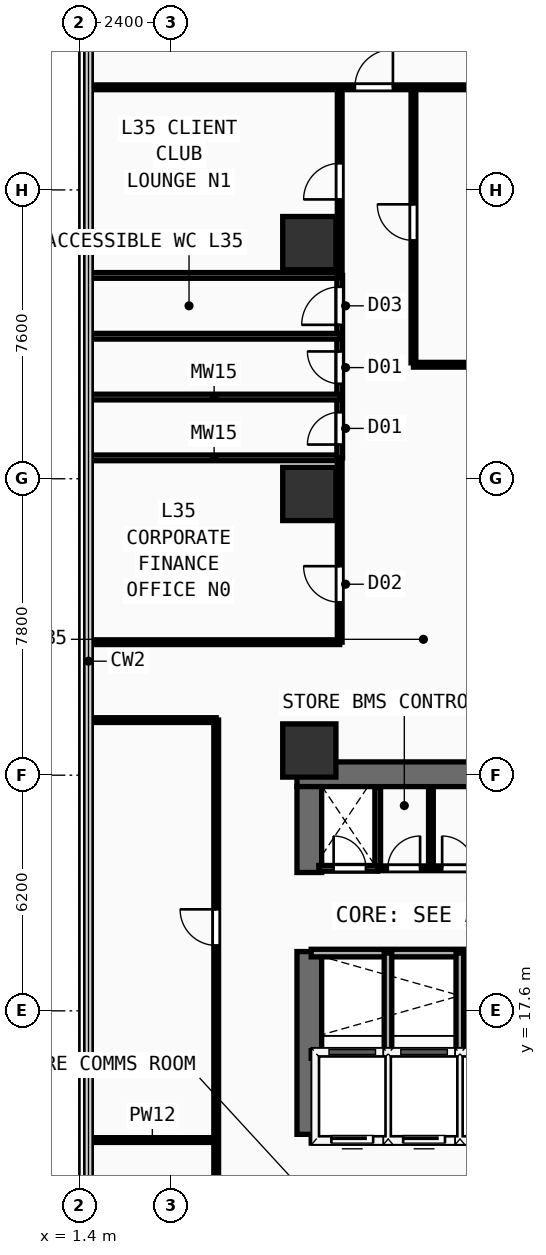
"""IFC4 building model, lengths in metres.
Left out: names, types, materials, properties, quantities, classifications, styles, units other than length and angle.
Written with IfcOpenShell. Run it as: python <this file> out.ifc"""

import sys

from ifc_helpers import new_model, si_unit, direction, frame, frame_2d, origin, origin_2d, place, context, subcontext, project, spatial, rectangle, extrude, element, fill, save


model = new_model("IFC4")
c1 = context("Model", 3, precision=1e-05, world=origin(), true_north=direction((0.0, 1.0)))
c2 = subcontext(c1, "Body", "Model", "MODEL_VIEW")
j1 = project(units=[si_unit("LENGTHUNIT", "METRE"), si_unit("PLANEANGLEUNIT", "RADIAN")], contexts=[c1])
p1 = place(None, origin())
s1 = spatial("IfcSite", under=j1, at=p1, CompositionType="ELEMENT")
p2 = place(p1, origin())
s2 = spatial("IfcBuilding", under=s1, at=p2, CompositionType="ELEMENT")
p3 = place(p2, frame((0.0, 0.0, 137.3)))
s3 = spatial("IfcBuildingStorey", under=s2, at=p3, CompositionType="ELEMENT", Elevation=137.3)
p4 = place(p3, frame((7.125, 23.825, 0.0), z_axis=(0.0, 0.0, 1.0), x_axis=(1.0, 0.0, 0.0)))
e1 = element("IfcWall", 1, at=p4, inside=s3, PredefinedType="SHEAR", context=c2, shape_type="SweptSolid", body=[
    extrude(rectangle(XDim=14.0, YDim=0.65, at=frame_2d((7.0, 0.0))), origin(), (0.0, 0.0, 1.0), 3.42),
])
p5 = place(p3, frame((7.45, 14.35, 0.0), z_axis=(0.0, 0.0, 1.0), x_axis=(0.0, 1.0, 0.0)))
e2 = element("IfcWall", 2, at=p5, inside=s3, PredefinedType="SHEAR", context=c2, shape_type="SweptSolid", body=[
    extrude(rectangle(XDim=4.81, YDim=0.65, at=frame_2d((2.405, 0.0))), origin(), (0.0, 0.0, 1.0), 3.42),
])
p6 = place(p3, frame((7.45, 21.24, 0.0), z_axis=(0.0, 0.0, 1.0), x_axis=(0.0, 1.0, 0.0)))
e3 = element("IfcWall", 3, at=p6, inside=s3, PredefinedType="SHEAR", context=c2, shape_type="SweptSolid", body=[
    extrude(rectangle(XDim=2.26, YDim=0.65, at=frame_2d((1.13, 0.0))), origin(), (0.0, 0.0, 1.0), 3.42),
])
for number, where, z_axis, x_axis in (
    (4, (7.45, 24.45, 0.0), (0.0, 0.0, 1.0), (1.0, 0.0, 0.0)),
    (5, (7.45, 31.2, 0.0), (0.0, 0.0, 1.0), (1.0, 0.0, 0.0)),
    (6, (7.45, 37.8, 0.0), (0.0, 0.0, 1.0), (1.0, 0.0, 0.0)),
):
    element("IfcColumn", number, at=place(p3, frame(where, z_axis=z_axis, x_axis=x_axis)), inside=s3, PredefinedType="COLUMN", context=c2, shape_type="SweptSolid", body=[
        extrude(rectangle(XDim=1.4, YDim=1.4, at=origin_2d()), origin(), (0.0, 0.0, 1.0), 3.42),
    ])
p7 = place(p3, frame((7.5, 14.22, 0.0), z_axis=(0.0, 0.0, 1.0), x_axis=(1.0, 0.0, 0.0)))
e7 = element("IfcWall", 7, at=p7, inside=s3, PredefinedType="PARTITIONING", context=c2, shape_type="SweptSolid", body=[
    extrude(rectangle(XDim=7.85, YDim=0.2, at=frame_2d((3.925, 0.0))), origin(), (0.0, 0.0, 1.0), 3.42),
])
p8 = place(p7, frame((0.53, 0.0, 0.0)))
e8 = element("IfcOpeningElement", 8, at=p8, cuts=e7, PredefinedType="OPENING", context=c2, shape_type="SweptSolid", body=[
    extrude(rectangle(XDim=1.1, YDim=2.2, at=frame_2d((0.55, 1.1))), frame((0.0, 0.11, 0.0), z_axis=(0.0, -1.0, 0.0), x_axis=(1.0, 0.0, 0.0)), (0.0, 0.0, 1.0), 0.22),
])
p9 = place(p7, frame((2.42, 0.0, 0.0)))
e9 = element("IfcOpeningElement", 9, at=p9, cuts=e7, PredefinedType="OPENING", context=c2, shape_type="SweptSolid", body=[
    extrude(rectangle(XDim=1.1, YDim=2.2, at=frame_2d((0.55, 1.1))), frame((0.0, 0.11, 0.0), z_axis=(0.0, -1.0, 0.0), x_axis=(1.0, 0.0, 0.0)), (0.0, 0.0, 1.0), 0.22),
])
p10 = place(p7, frame((4.31, 0.0, 0.0)))
e10 = element("IfcOpeningElement", 10, at=p10, cuts=e7, PredefinedType="OPENING", context=c2, shape_type="SweptSolid", body=[
    extrude(rectangle(XDim=1.1, YDim=2.2, at=frame_2d((0.55, 1.1))), frame((0.0, 0.11, 0.0), z_axis=(0.0, -1.0, 0.0), x_axis=(1.0, 0.0, 0.0)), (0.0, 0.0, 1.0), 0.22),
])
p11 = place(p7, frame((6.2, 0.0, 0.0)))
e11 = element("IfcOpeningElement", 11, at=p11, cuts=e7, PredefinedType="OPENING", context=c2, shape_type="SweptSolid", body=[
    extrude(rectangle(XDim=1.1, YDim=2.2, at=frame_2d((0.55, 1.1))), frame((0.0, 0.11, 0.0), z_axis=(0.0, -1.0, 0.0), x_axis=(1.0, 0.0, 0.0)), (0.0, 0.0, 1.0), 0.22),
])
p12 = place(p3, frame((7.5, 16.45, 0.0), z_axis=(0.0, 0.0, 1.0), x_axis=(1.0, 0.0, 0.0)))
e12 = element("IfcWall", 12, at=p12, inside=s3, PredefinedType="PARTITIONING", context=c2, shape_type="SweptSolid", body=[
    extrude(rectangle(XDim=7.85, YDim=0.2, at=frame_2d((3.925, 0.0))), origin(), (0.0, 0.0, 1.0), 3.42),
])
for number, where, z_axis, x_axis in (
    (13, (9.52, 14.22, 0.0), (0.0, 0.0, 1.0), (0.0, 1.0, 0.0)),
    (14, (11.41, 14.22, 0.0), (0.0, 0.0, 1.0), (0.0, 1.0, 0.0)),
):
    element("IfcWall", number, at=place(p3, frame(where, z_axis=z_axis, x_axis=x_axis)), inside=s3, PredefinedType="PARTITIONING", context=c2, shape_type="SweptSolid", body=[
        extrude(rectangle(XDim=2.23, YDim=0.2, at=frame_2d((1.115, 0.0))), origin(), (0.0, 0.0, 1.0), 3.42),
    ])
p13 = place(p3, frame((7.5, 19.12, 0.0), z_axis=(0.0, 0.0, 1.0), x_axis=(1.0, 0.0, 0.0)))
e15 = element("IfcWall", 15, at=p13, inside=s3, PredefinedType="PARTITIONING", context=c2, shape_type="SweptSolid", body=[
    extrude(rectangle(XDim=7.85, YDim=0.2, at=frame_2d((3.925, 0.0))), origin(), (0.0, 0.0, 1.0), 3.42),
])
for number, where, z_axis, x_axis in (
    (16, (9.52, 16.45, 0.0), (0.0, 0.0, 1.0), (0.0, 1.0, 0.0)),
    (17, (11.41, 16.45, 0.0), (0.0, 0.0, 1.0), (0.0, 1.0, 0.0)),
):
    element("IfcWall", number, at=place(p3, frame(where, z_axis=z_axis, x_axis=x_axis)), inside=s3, PredefinedType="PARTITIONING", context=c2, shape_type="SweptSolid", body=[
        extrude(rectangle(XDim=2.67, YDim=0.2, at=frame_2d((1.335, 0.0))), origin(), (0.0, 0.0, 1.0), 3.42),
    ])
p14 = place(p3, frame((9.25, 21.35, 0.0), z_axis=(0.0, 0.0, 1.0), x_axis=(0.0, 1.0, 0.0)))
e18 = element("IfcWall", 18, at=p14, inside=s3, PredefinedType="PARTITIONING", context=c2, shape_type="SweptSolid", body=[
    extrude(rectangle(XDim=2.13, YDim=0.15, at=frame_2d((1.065, 0.0))), origin(), (0.0, 0.0, 1.0), 3.42),
])
p15 = place(p3, frame((7.7, 21.35, 0.0), z_axis=(0.0, 0.0, 1.0), x_axis=(1.0, 0.0, 0.0)))
e19 = element("IfcWall", 19, at=p15, inside=s3, PredefinedType="PARTITIONING", context=c2, shape_type="SweptSolid", body=[
    extrude(rectangle(XDim=1.55, YDim=0.15, at=frame_2d((0.775, 0.0))), origin(), (0.0, 0.0, 1.0), 3.42),
])
p16 = place(p15, frame((0.39, 0.0, 0.0)))
e20 = element("IfcOpeningElement", 20, at=p16, cuts=e19, PredefinedType="OPENING", context=c2, shape_type="SweptSolid", body=[
    extrude(rectangle(XDim=0.85, YDim=2.15, at=frame_2d((0.425, 1.075))), frame((0.0, 0.085, 0.0), z_axis=(0.0, -1.0, 0.0), x_axis=(1.0, 0.0, 0.0)), (0.0, 0.0, 1.0), 0.17),
])
p17 = place(p3, frame((9.25, 21.35, 0.0), z_axis=(0.0, 0.0, 1.0), x_axis=(1.0, 0.0, 0.0)))
e21 = element("IfcWall", 21, at=p17, inside=s3, PredefinedType="PARTITIONING", context=c2, shape_type="SweptSolid", body=[
    extrude(rectangle(XDim=4.65, YDim=0.125, at=frame_2d((2.325, 0.0))), origin(), (0.0, 0.0, 1.0), 3.42),
])
p18 = place(p17, frame((0.265, 0.0, 0.0)))
e22 = element("IfcOpeningElement", 22, at=p18, cuts=e21, PredefinedType="OPENING", context=c2, shape_type="SweptSolid", body=[
    extrude(rectangle(XDim=0.85, YDim=2.15, at=frame_2d((0.425, 1.075))), frame((0.0, 0.073, 0.0), z_axis=(0.0, -1.0, 0.0), x_axis=(1.0, 0.0, 0.0)), (0.0, 0.0, 1.0), 0.145),
])
p19 = place(p17, frame((1.695, 0.0, 0.0)))
e23 = element("IfcOpeningElement", 23, at=p19, cuts=e21, PredefinedType="OPENING", context=c2, shape_type="SweptSolid", body=[
    extrude(rectangle(XDim=0.85, YDim=2.15, at=frame_2d((0.425, 1.075))), frame((0.0, 0.073, 0.0), z_axis=(0.0, -1.0, 0.0), x_axis=(1.0, 0.0, 0.0)), (0.0, 0.0, 1.0), 0.145),
])
p20 = place(p17, frame((3.19, 0.0, 0.0)))
e24 = element("IfcOpeningElement", 24, at=p20, cuts=e21, PredefinedType="OPENING", context=c2, shape_type="SweptSolid", body=[
    extrude(rectangle(XDim=0.85, YDim=2.15, at=frame_2d((0.425, 1.075))), frame((0.0, 0.073, 0.0), z_axis=(0.0, -1.0, 0.0), x_axis=(1.0, 0.0, 0.0)), (0.0, 0.0, 1.0), 0.145),
])
p21 = place(p3, frame((10.65, 21.35, 0.0), z_axis=(0.0, 0.0, 1.0), x_axis=(0.0, 1.0, 0.0)))
e25 = element("IfcWall", 25, at=p21, inside=s3, PredefinedType="PARTITIONING", context=c2, shape_type="SweptSolid", body=[
    extrude(rectangle(XDim=2.1, YDim=0.125, at=frame_2d((1.05, 0.0))), origin(), (0.0, 0.0, 1.0), 3.42),
])
p22 = place(p3, frame((8.25, 27.3, 0.0), z_axis=(0.0, 0.0, 1.0), x_axis=(0.0, 1.0, 0.0)))
e26 = element("IfcWall", 26, at=p22, inside=s3, PredefinedType="PARTITIONING", context=c2, shape_type="SweptSolid", body=[
    extrude(rectangle(XDim=4.85, YDim=0.125, at=frame_2d((2.425, 0.0))), origin(), (0.0, 0.0, 1.0), 3.42),
])
p23 = place(p22, frame((1.05, 0.0, 0.0)))
e27 = element("IfcOpeningElement", 27, at=p23, cuts=e26, PredefinedType="OPENING", context=c2, shape_type="SweptSolid", body=[
    extrude(rectangle(XDim=0.95, YDim=2.15, at=frame_2d((0.475, 1.075))), frame((0.0, 0.073, 0.0), z_axis=(0.0, -1.0, 0.0), x_axis=(1.0, 0.0, 0.0)), (0.0, 0.0, 1.0), 0.145),
])
p24 = place(p3, frame((1.64, 27.3, 0.0), z_axis=(0.0, 0.0, 1.0), x_axis=(1.0, 0.0, 0.0)))
e28 = element("IfcWall", 28, at=p24, inside=s3, PredefinedType="PARTITIONING", context=c2, shape_type="SweptSolid", body=[
    extrude(rectangle(XDim=6.61, YDim=0.125, at=frame_2d((3.305, 0.0))), origin(), (0.0, 0.0, 1.0), 3.42),
])
p25 = place(p3, frame((1.64, 32.15, 0.0), z_axis=(0.0, 0.0, 1.0), x_axis=(1.0, 0.0, 0.0)))
e29 = element("IfcWall", 29, at=p25, inside=s3, PredefinedType="PLUMBINGWALL", context=c2, shape_type="SweptSolid", body=[
    extrude(rectangle(XDim=6.61, YDim=0.15, at=frame_2d((3.305, 0.0))), origin(), (0.0, 0.0, 1.0), 3.42),
])
p26 = place(p3, frame((8.25, 32.15, 0.0), z_axis=(0.0, 0.0, 1.0), x_axis=(0.0, 1.0, 0.0)))
e30 = element("IfcWall", 30, at=p26, inside=s3, PredefinedType="PLUMBINGWALL", context=c2, shape_type="SweptSolid", body=[
    extrude(rectangle(XDim=4.8, YDim=0.15, at=frame_2d((2.4, 0.0))), origin(), (0.0, 0.0, 1.0), 3.42),
])
p27 = place(p26, frame((0.35, 0.0, 0.0)))
e31 = element("IfcOpeningElement", 31, at=p27, cuts=e30, PredefinedType="OPENING", context=c2, shape_type="SweptSolid", body=[
    extrude(rectangle(XDim=0.85, YDim=2.15, at=frame_2d((0.425, 1.075))), frame((0.0, 0.085, 0.0), z_axis=(0.0, -1.0, 0.0), x_axis=(1.0, 0.0, 0.0)), (0.0, 0.0, 1.0), 0.17),
])
p28 = place(p26, frame((1.95, 0.0, 0.0)))
e32 = element("IfcOpeningElement", 32, at=p28, cuts=e30, PredefinedType="OPENING", context=c2, shape_type="SweptSolid", body=[
    extrude(rectangle(XDim=0.85, YDim=2.15, at=frame_2d((0.425, 1.075))), frame((0.0, 0.085, 0.0), z_axis=(0.0, -1.0, 0.0), x_axis=(1.0, 0.0, 0.0)), (0.0, 0.0, 1.0), 0.17),
])
p29 = place(p26, frame((3.5, 0.0, 0.0)))
e33 = element("IfcOpeningElement", 33, at=p29, cuts=e30, PredefinedType="OPENING", context=c2, shape_type="SweptSolid", body=[
    extrude(rectangle(XDim=1.0, YDim=2.2, at=frame_2d((0.5, 1.1))), frame((0.0, 0.085, 0.0), z_axis=(0.0, -1.0, 0.0), x_axis=(1.0, 0.0, 0.0)), (0.0, 0.0, 1.0), 0.17),
])
for number, where, z_axis, x_axis in (
    (34, (1.64, 33.75, 0.0), (0.0, 0.0, 1.0), (1.0, 0.0, 0.0)),
    (35, (1.64, 35.35, 0.0), (0.0, 0.0, 1.0), (1.0, 0.0, 0.0)),
):
    element("IfcWall", number, at=place(p3, frame(where, z_axis=z_axis, x_axis=x_axis)), inside=s3, PredefinedType="PLUMBINGWALL", context=c2, shape_type="SweptSolid", body=[
        extrude(rectangle(XDim=6.61, YDim=0.15, at=frame_2d((3.305, 0.0))), origin(), (0.0, 0.0, 1.0), 3.02),
    ])
p30 = place(p3, frame((1.64, 36.95, 0.0), z_axis=(0.0, 0.0, 1.0), x_axis=(1.0, 0.0, 0.0)))
e36 = element("IfcWall", 36, at=p30, inside=s3, PredefinedType="PLUMBINGWALL", context=c2, shape_type="SweptSolid", body=[
    extrude(rectangle(XDim=6.61, YDim=0.15, at=frame_2d((3.305, 0.0))), origin(), (0.0, 0.0, 1.0), 3.42),
])
p31 = place(p3, frame((5.0, 7.5, 0.0), z_axis=(0.0, 0.0, 1.0), x_axis=(0.0, 1.0, 0.0)))
e37 = element("IfcWall", 37, at=p31, inside=s3, PredefinedType="PARTITIONING", context=c2, shape_type="SweptSolid", body=[
    extrude(rectangle(XDim=17.75, YDim=0.125, at=frame_2d((8.875, 0.0))), origin(), (0.0, 0.0, 1.0), 3.42),
])
p32 = place(p31, frame((2.85, 0.0, 0.0)))
e38 = element("IfcOpeningElement", 38, at=p32, cuts=e37, PredefinedType="OPENING", context=c2, shape_type="SweptSolid", body=[
    extrude(rectangle(XDim=0.95, YDim=2.15, at=frame_2d((0.475, 1.075))), frame((0.0, 0.073, 0.0), z_axis=(0.0, -1.0, 0.0), x_axis=(1.0, 0.0, 0.0)), (0.0, 0.0, 1.0), 0.145),
])
p33 = place(p31, frame((11.821, 0.0, 0.0)))
e39 = element("IfcOpeningElement", 39, at=p33, cuts=e37, PredefinedType="OPENING", context=c2, shape_type="SweptSolid", body=[
    extrude(rectangle(XDim=0.95, YDim=2.15, at=frame_2d((0.475, 1.075))), frame((0.0, 0.073, 0.0), z_axis=(0.0, -1.0, 0.0), x_axis=(1.0, 0.0, 0.0)), (0.0, 0.0, 1.0), 0.145),
])
for number, where, z_axis, x_axis in (
    (40, (1.64, 25.25, 0.0), (0.0, 0.0, 1.0), (1.0, 0.0, 0.0)),
    (41, (1.64, 14.2, 0.0), (0.0, 0.0, 1.0), (1.0, 0.0, 0.0)),
):
    element("IfcWall", number, at=place(p3, frame(where, z_axis=z_axis, x_axis=x_axis)), inside=s3, PredefinedType="PARTITIONING", context=c2, shape_type="SweptSolid", body=[
        extrude(rectangle(XDim=3.36, YDim=0.125, at=frame_2d((1.68, 0.0))), origin(), (0.0, 0.0, 1.0), 3.42),
    ])
p34 = place(p3, frame((10.19, 34.6, 0.0), z_axis=(0.0, 0.0, 1.0), x_axis=(1.0, 0.0, 0.0)))
e42 = element("IfcWall", 42, at=p34, inside=s3, PredefinedType="PARTITIONING", context=c2, shape_type="SweptSolid", body=[
    extrude(rectangle(XDim=13.57, YDim=0.125, at=frame_2d((6.785, 0.0))), origin(), (0.0, 0.0, 1.0), 3.42),
])
p35 = place(p3, frame((8.25, 36.95, 0.0), z_axis=(0.0, 0.0, 1.0), x_axis=(0.0, 1.0, 0.0)))
e43 = element("IfcWall", 43, at=p35, inside=s3, PredefinedType="PARTITIONING", context=c2, shape_type="SweptSolid", body=[
    extrude(rectangle(XDim=4.95, YDim=0.125, at=frame_2d((2.475, 0.0))), origin(), (0.0, 0.0, 1.0), 3.42),
])
p36 = place(p35, frame((2.0, 0.0, 0.0)))
e44 = element("IfcOpeningElement", 44, at=p36, cuts=e43, PredefinedType="OPENING", context=c2, shape_type="SweptSolid", body=[
    extrude(rectangle(XDim=0.95, YDim=2.15, at=frame_2d((0.475, 1.075))), frame((0.0, 0.073, 0.0), z_axis=(0.0, -1.0, 0.0), x_axis=(1.0, 0.0, 0.0)), (0.0, 0.0, 1.0), 0.145),
])
p37 = place(p3, frame((1.64, 41.9, 0.0), z_axis=(0.0, 0.0, 1.0), x_axis=(1.0, 0.0, 0.0)))
e45 = element("IfcWall", 45, at=p37, inside=s3, PredefinedType="PARTITIONING", context=c2, shape_type="SweptSolid", body=[
    extrude(rectangle(XDim=22.12, YDim=0.125, at=frame_2d((11.06, 0.0))), origin(), (0.0, 0.0, 1.0), 3.42),
])
p38 = place(p37, frame((7.01, 0.0, 0.0)))
e46 = element("IfcOpeningElement", 46, at=p38, cuts=e45, PredefinedType="OPENING", context=c2, shape_type="SweptSolid", body=[
    extrude(rectangle(XDim=1.0, YDim=2.2, at=frame_2d((0.5, 1.1))), frame((0.0, 0.073, 0.0), z_axis=(0.0, -1.0, 0.0), x_axis=(1.0, 0.0, 0.0)), (0.0, 0.0, 1.0), 0.145),
])
p39 = place(p3, frame((10.19, 34.65, 0.0), z_axis=(0.0, 0.0, 1.0), x_axis=(0.0, 1.0, 0.0)))
e47 = element("IfcWall", 47, at=p39, inside=s3, PredefinedType="PARTITIONING", context=c2, shape_type="SweptSolid", body=[
    extrude(rectangle(XDim=7.25, YDim=0.125, at=frame_2d((3.625, 0.0))), origin(), (0.0, 0.0, 1.0), 3.42),
])
p40 = place(p39, frame((3.22, 0.0, 0.0)))
e48 = element("IfcOpeningElement", 48, at=p40, cuts=e47, PredefinedType="OPENING", context=c2, shape_type="SweptSolid", body=[
    extrude(rectangle(XDim=0.95, YDim=2.15, at=frame_2d((0.475, 1.075))), frame((0.0, 0.073, 0.0), z_axis=(0.0, -1.0, 0.0), x_axis=(1.0, 0.0, 0.0)), (0.0, 0.0, 1.0), 0.145),
])
p41 = place(p8, frame((1.1, 0.0, 0.0), z_axis=(0.0, 0.0, 1.0), x_axis=(-1.0, 0.0, 0.0)))
e49 = element("IfcDoor", 49, at=p41, inside=s3, OperationType="SLIDING_TO_LEFT", PredefinedType="DOOR", context=c2, shape_type="SweptSolid", body=[
    extrude(rectangle(XDim=1.1, YDim=2.2, at=frame_2d((0.55, 1.1))), frame((0.0, 0.025, 0.0), z_axis=(0.0, -1.0, 0.0), x_axis=(1.0, 0.0, 0.0)), (0.0, 0.0, 1.0), 0.05),
])
fill(e8, e49)
p42 = place(p9, frame((1.1, 0.0, 0.0), z_axis=(0.0, 0.0, 1.0), x_axis=(-1.0, 0.0, 0.0)))
e50 = element("IfcDoor", 50, at=p42, inside=s3, OperationType="SLIDING_TO_LEFT", PredefinedType="DOOR", context=c2, shape_type="SweptSolid", body=[
    extrude(rectangle(XDim=1.1, YDim=2.2, at=frame_2d((0.55, 1.1))), frame((0.0, 0.025, 0.0), z_axis=(0.0, -1.0, 0.0), x_axis=(1.0, 0.0, 0.0)), (0.0, 0.0, 1.0), 0.05),
])
fill(e9, e50)
p43 = place(p16, origin())
e51 = element("IfcDoor", 51, at=p43, inside=s3, OperationType="SINGLE_SWING_LEFT", PredefinedType="DOOR", context=c2, shape_type="SweptSolid", body=[
    extrude(rectangle(XDim=0.85, YDim=2.15, at=frame_2d((0.425, 1.075))), frame((0.0, 0.025, 0.0), z_axis=(0.0, -1.0, 0.0), x_axis=(1.0, 0.0, 0.0)), (0.0, 0.0, 1.0), 0.05),
])
fill(e20, e51)
p44 = place(p18, origin())
e52 = element("IfcDoor", 52, at=p44, inside=s3, OperationType="SINGLE_SWING_RIGHT", PredefinedType="DOOR", context=c2, shape_type="SweptSolid", body=[
    extrude(rectangle(XDim=0.85, YDim=2.15, at=frame_2d((0.425, 1.075))), frame((0.0, 0.025, 0.0), z_axis=(0.0, -1.0, 0.0), x_axis=(1.0, 0.0, 0.0)), (0.0, 0.0, 1.0), 0.05),
])
fill(e22, e52)
p45 = place(p19, origin())
e53 = element("IfcDoor", 53, at=p45, inside=s3, OperationType="SINGLE_SWING_LEFT", PredefinedType="DOOR", context=c2, shape_type="SweptSolid", body=[
    extrude(rectangle(XDim=0.85, YDim=2.15, at=frame_2d((0.425, 1.075))), frame((0.0, 0.025, 0.0), z_axis=(0.0, -1.0, 0.0), x_axis=(1.0, 0.0, 0.0)), (0.0, 0.0, 1.0), 0.05),
])
fill(e23, e53)
p46 = place(p23, origin())
e54 = element("IfcDoor", 54, at=p46, inside=s3, OperationType="SINGLE_SWING_RIGHT", PredefinedType="DOOR", context=c2, shape_type="SweptSolid", body=[
    extrude(rectangle(XDim=0.95, YDim=2.15, at=frame_2d((0.475, 1.075))), frame((0.0, 0.025, 0.0), z_axis=(0.0, -1.0, 0.0), x_axis=(1.0, 0.0, 0.0)), (0.0, 0.0, 1.0), 0.05),
])
fill(e27, e54)
p47 = place(p27, origin())
e55 = element("IfcDoor", 55, at=p47, inside=s3, OperationType="SINGLE_SWING_LEFT", PredefinedType="DOOR", context=c2, shape_type="SweptSolid", body=[
    extrude(rectangle(XDim=0.85, YDim=2.15, at=frame_2d((0.425, 1.075))), frame((0.0, 0.025, 0.0), z_axis=(0.0, -1.0, 0.0), x_axis=(1.0, 0.0, 0.0)), (0.0, 0.0, 1.0), 0.05),
])
fill(e31, e55)
p48 = place(p28, origin())
e56 = element("IfcDoor", 56, at=p48, inside=s3, OperationType="SINGLE_SWING_RIGHT", PredefinedType="DOOR", context=c2, shape_type="SweptSolid", body=[
    extrude(rectangle(XDim=0.85, YDim=2.15, at=frame_2d((0.425, 1.075))), frame((0.0, 0.025, 0.0), z_axis=(0.0, -1.0, 0.0), x_axis=(1.0, 0.0, 0.0)), (0.0, 0.0, 1.0), 0.05),
])
fill(e32, e56)
p49 = place(p29, origin())
e57 = element("IfcDoor", 57, at=p49, inside=s3, OperationType="SINGLE_SWING_LEFT", PredefinedType="DOOR", context=c2, shape_type="SweptSolid", body=[
    extrude(rectangle(XDim=1.0, YDim=2.2, at=frame_2d((0.5, 1.1))), frame((0.0, 0.025, 0.0), z_axis=(0.0, -1.0, 0.0), x_axis=(1.0, 0.0, 0.0)), (0.0, 0.0, 1.0), 0.05),
])
fill(e33, e57)
p50 = place(p33, origin())
e58 = element("IfcDoor", 58, at=p50, inside=s3, OperationType="SINGLE_SWING_RIGHT", PredefinedType="DOOR", context=c2, shape_type="SweptSolid", body=[
    extrude(rectangle(XDim=0.95, YDim=2.15, at=frame_2d((0.475, 1.075))), frame((0.0, 0.025, 0.0), z_axis=(0.0, -1.0, 0.0), x_axis=(1.0, 0.0, 0.0)), (0.0, 0.0, 1.0), 0.05),
])
fill(e39, e58)
p51 = place(p36, origin())
e59 = element("IfcDoor", 59, at=p51, inside=s3, OperationType="SINGLE_SWING_LEFT", PredefinedType="DOOR", context=c2, shape_type="SweptSolid", body=[
    extrude(rectangle(XDim=0.95, YDim=2.15, at=frame_2d((0.475, 1.075))), frame((0.0, 0.025, 0.0), z_axis=(0.0, -1.0, 0.0), x_axis=(1.0, 0.0, 0.0)), (0.0, 0.0, 1.0), 0.05),
])
fill(e44, e59)
p52 = place(p38, origin())
e60 = element("IfcDoor", 60, at=p52, inside=s3, OperationType="SINGLE_SWING_RIGHT", PredefinedType="DOOR", context=c2, shape_type="SweptSolid", body=[
    extrude(rectangle(XDim=1.0, YDim=2.2, at=frame_2d((0.5, 1.1))), frame((0.0, 0.025, 0.0), z_axis=(0.0, -1.0, 0.0), x_axis=(1.0, 0.0, 0.0)), (0.0, 0.0, 1.0), 0.05),
])
fill(e46, e60)
p53 = place(p40, origin())
e61 = element("IfcDoor", 61, at=p53, inside=s3, OperationType="SINGLE_SWING_RIGHT", PredefinedType="DOOR", context=c2, shape_type="SweptSolid", body=[
    extrude(rectangle(XDim=0.95, YDim=2.15, at=frame_2d((0.475, 1.075))), frame((0.0, 0.025, 0.0), z_axis=(0.0, -1.0, 0.0), x_axis=(1.0, 0.0, 0.0)), (0.0, 0.0, 1.0), 0.05),
])
fill(e48, e61)
save(model, sys.argv[1])
